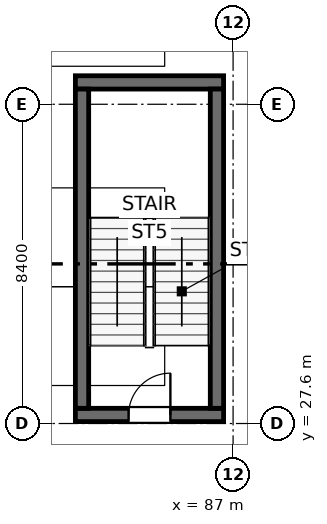
"""IFC4 building model, lengths in metres.
Left out: names, types, materials, properties, quantities, classifications, styles, units other than length and angle.
Written with IfcOpenShell. Run it as: python <this file> out.ifc"""

import sys

from ifc_helpers import new_model, si_unit, direction, frame, frame_2d, origin, place, context, subcontext, project, spatial, rectangle, extrude, element, fill, save


model = new_model("IFC4")
c1 = context("Model", 3, precision=1e-05, world=origin(), true_north=direction((0.0, 1.0)))
c2 = subcontext(c1, "Body", "Model", "MODEL_VIEW")
j1 = project(units=[si_unit("LENGTHUNIT", "METRE"), si_unit("PLANEANGLEUNIT", "RADIAN")], contexts=[c1])
p1 = place(None, origin())
s1 = spatial("IfcSite", under=j1, at=p1, CompositionType="ELEMENT")
p2 = place(p1, origin())
s2 = spatial("IfcBuilding", under=s1, at=p2, CompositionType="ELEMENT")
p3 = place(p2, frame((0.0, 0.0, -9.0)))
s3 = spatial("IfcBuildingStorey", under=s2, at=p3, CompositionType="ELEMENT", Elevation=-9.0)
p4 = place(p3, frame((82.85, 27.825, 0.0), z_axis=(0.0, 0.0, 1.0), x_axis=(1.0, 0.0, 0.0)))
e1 = element("IfcWall", 1, at=p4, inside=s3, PredefinedType="SHEAR", context=c2, shape_type="SweptSolid", body=[
    extrude(rectangle(XDim=3.9, YDim=0.35, at=frame_2d((1.95, 0.0))), origin(), (0.0, 0.0, 1.0), 4.5),
])
p5 = place(p4, frame((1.4, 0.0, 0.0)))
e2 = element("IfcOpeningElement", 2, at=p5, cuts=e1, PredefinedType="OPENING", context=c2, shape_type="SweptSolid", body=[
    extrude(rectangle(XDim=1.1, YDim=2.05, at=frame_2d((0.55, 1.025))), frame((0.0, 0.185, 0.0), z_axis=(0.0, -1.0, 0.0), x_axis=(1.0, 0.0, 0.0)), (0.0, 0.0, 1.0), 0.37),
])
p6 = place(p3, frame((82.85, 36.575, 0.0), z_axis=(0.0, 0.0, 1.0), x_axis=(1.0, 0.0, 0.0)))
e3 = element("IfcWall", 3, at=p6, inside=s3, PredefinedType="SHEAR", context=c2, shape_type="SweptSolid", body=[
    extrude(rectangle(XDim=3.9, YDim=0.35, at=frame_2d((1.95, 0.0))), origin(), (0.0, 0.0, 1.0), 4.5),
])
for number, where, z_axis, x_axis in (
    (4, (83.025, 28.0, 0.0), (0.0, 0.0, 1.0), (0.0, 1.0, 0.0)),
    (5, (86.575, 28.0, 0.0), (0.0, 0.0, 1.0), (0.0, 1.0, 0.0)),
):
    element("IfcWall", number, at=place(p3, frame(where, z_axis=z_axis, x_axis=x_axis)), inside=s3, PredefinedType="SHEAR", context=c2, shape_type="SweptSolid", body=[
        extrude(rectangle(XDim=8.4, YDim=0.35, at=frame_2d((4.2, 0.0))), origin(), (0.0, 0.0, 1.0), 4.5),
    ])
p7 = place(p5, origin())
e6 = element("IfcDoor", 6, at=p7, inside=s3, OperationType="SINGLE_SWING_RIGHT", PredefinedType="DOOR", context=c2, shape_type="SweptSolid", body=[
    extrude(rectangle(XDim=1.1, YDim=2.05, at=frame_2d((0.55, 1.025))), frame((0.0, 0.025, 0.0), z_axis=(0.0, -1.0, 0.0), x_axis=(1.0, 0.0, 0.0)), (0.0, 0.0, 1.0), 0.05),
])
fill(e2, e6)
save(model, sys.argv[1])
